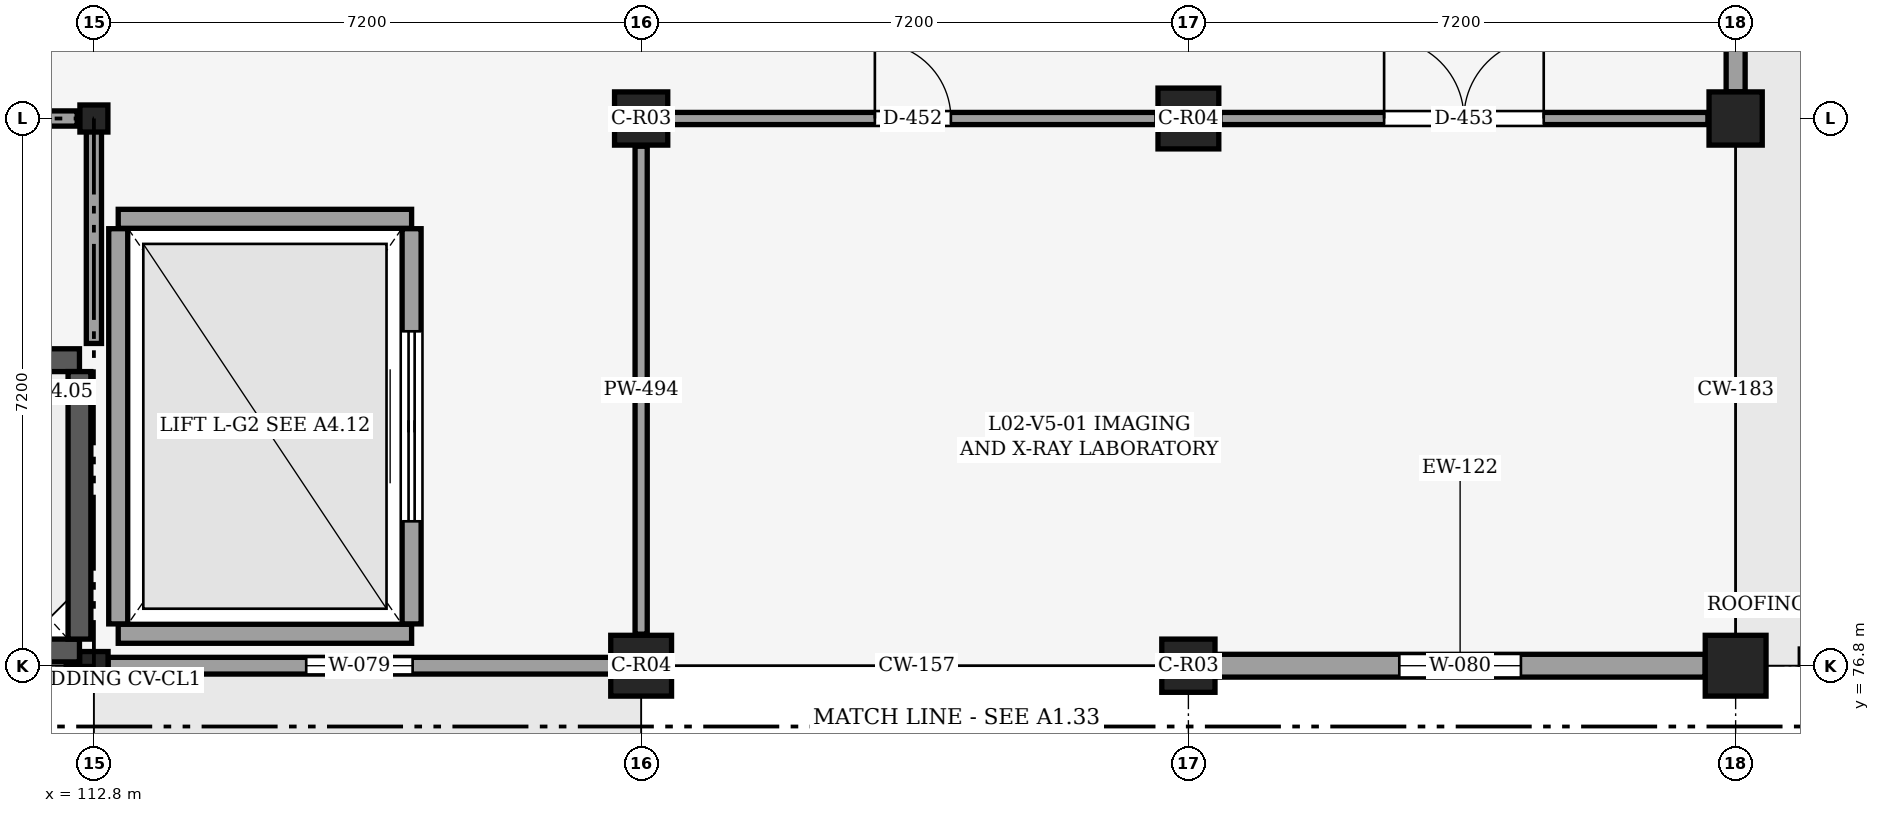
"""IFC4 building model, lengths in metres.
Left out: names, types, materials, properties, quantities, classifications, styles, units other than length and angle.
Written with IfcOpenShell. Run it as: python <this file> out.ifc"""

import sys

from ifc_helpers import new_model, si_unit, direction, frame, frame_2d, origin, origin_2d, place, context, subcontext, project, spatial, rectangle, i_section, extrude, element, fill, save


model = new_model("IFC4")
c1 = context("Model", 3, precision=1e-05, world=origin(), true_north=direction((0.0, 1.0)))
c2 = subcontext(c1, "Body", "Model", "MODEL_VIEW")
j1 = project(units=[si_unit("LENGTHUNIT", "METRE"), si_unit("PLANEANGLEUNIT", "RADIAN")], contexts=[c1])
p1 = place(None, origin())
s1 = spatial("IfcSite", under=j1, at=p1, CompositionType="ELEMENT")
p2 = place(p1, origin())
s2 = spatial("IfcBuilding", under=s1, at=p2, CompositionType="ELEMENT")
p3 = place(p2, frame((0.0, 0.0, 10.2)))
s3 = spatial("IfcBuildingStorey", under=s2, at=p3, CompositionType="ELEMENT", Elevation=10.2)
p4 = place(p3, frame((112.8, 76.8, 0.0), z_axis=(0.0, 0.0, 1.0), x_axis=(1.0, 0.0, 0.0)))
e1 = element("IfcColumn", 1, at=p4, inside=s3, PredefinedType="COLUMN", context=c2, shape_type="SweptSolid", body=[
    extrude(i_section(OverallWidth=0.373, OverallDepth=0.373, WebThickness=0.016, FlangeThickness=0.026, FilletRadius=0.025, at=origin_2d()), origin(), (0.0, 0.0, 1.0), 4.8),
])
p5 = place(p3, frame((112.8, 84.0, 0.0), z_axis=(0.0, 0.0, 1.0), x_axis=(1.0, 0.0, 0.0)))
e2 = element("IfcColumn", 2, at=p5, inside=s3, PredefinedType="COLUMN", context=c2, shape_type="SweptSolid", body=[
    extrude(i_section(OverallWidth=0.368, OverallDepth=0.356, WebThickness=0.011, FlangeThickness=0.018, FilletRadius=0.025, at=origin_2d()), origin(), (0.0, 0.0, 1.0), 4.8),
])
p6 = place(p3, frame((120.0, 76.8, 0.0), z_axis=(0.0, 0.0, 1.0), x_axis=(1.0, 0.0, 0.0)))
e3 = element("IfcColumn", 3, at=p6, inside=s3, PredefinedType="COLUMN", context=c2, shape_type="SweptSolid", body=[
    extrude(rectangle(XDim=0.8, YDim=0.8, at=origin_2d()), origin(), (0.0, 0.0, 1.0), 4.8),
])
for number, where, z_axis, x_axis in (
    (4, (120.0, 84.0, 0.0), (0.0, 0.0, 1.0), (1.0, 0.0, 0.0)),
    (5, (127.2, 76.8, 0.0), (0.0, 0.0, 1.0), (1.0, 0.0, 0.0)),
):
    element("IfcColumn", number, at=place(p3, frame(where, z_axis=z_axis, x_axis=x_axis)), inside=s3, PredefinedType="COLUMN", context=c2, shape_type="SweptSolid", body=[
        extrude(rectangle(XDim=0.7, YDim=0.7, at=origin_2d()), origin(), (0.0, 0.0, 1.0), 4.8),
    ])
for number, where, z_axis, x_axis in (
    (6, (127.2, 84.0, 0.0), (0.0, 0.0, 1.0), (1.0, 0.0, 0.0)),
    (7, (134.4, 76.8, 0.0), (0.0, 0.0, 1.0), (1.0, 0.0, 0.0)),
):
    element("IfcColumn", number, at=place(p3, frame(where, z_axis=z_axis, x_axis=x_axis)), inside=s3, PredefinedType="COLUMN", context=c2, shape_type="SweptSolid", body=[
        extrude(rectangle(XDim=0.8, YDim=0.8, at=origin_2d()), origin(), (0.0, 0.0, 1.0), 4.8),
    ])
p7 = place(p3, frame((134.4, 84.0, 0.0), z_axis=(0.0, 0.0, 1.0), x_axis=(1.0, 0.0, 0.0)))
e8 = element("IfcColumn", 8, at=p7, inside=s3, PredefinedType="COLUMN", context=c2, shape_type="SweptSolid", body=[
    extrude(rectangle(XDim=0.7, YDim=0.7, at=origin_2d()), origin(), (0.0, 0.0, 1.0), 4.8),
])
p8 = place(p3, frame((119.6, 76.8, 0.0), z_axis=(0.0, 0.0, 1.0), x_axis=(-1.0, 0.0, 0.0)))
e9 = element("IfcWall", 9, at=p8, inside=s3, PredefinedType="SOLIDWALL", context=c2, shape_type="SweptSolid", body=[
    extrude(rectangle(XDim=6.614, YDim=0.22, at=frame_2d((3.307, 0.0))), origin(), (0.0, 0.0, 1.0), 3.933),
])
p9 = place(p8, frame((2.607, 0.0, 0.9)))
e10 = element("IfcOpeningElement", 10, at=p9, cuts=e9, PredefinedType="OPENING", context=c2, shape_type="SweptSolid", body=[
    extrude(rectangle(XDim=1.4, YDim=1.75, at=frame_2d((0.7, 0.875))), frame((0.0, 0.12, 0.0), z_axis=(0.0, -1.0, 0.0), x_axis=(1.0, 0.0, 0.0)), (0.0, 0.0, 1.0), 0.24),
])
p10 = place(p3, frame((134.0, 76.8, 0.0), z_axis=(0.0, 0.0, 1.0), x_axis=(-1.0, 0.0, 0.0)))
e11 = element("IfcWall", 11, at=p10, inside=s3, PredefinedType="SOLIDWALL", context=c2, shape_type="SweptSolid", body=[
    extrude(rectangle(XDim=6.45, YDim=0.3, at=frame_2d((3.225, 0.0))), origin(), (0.0, 0.0, 1.0), 4.184),
])
p11 = place(p10, frame((2.425, 0.0, 0.9)))
e12 = element("IfcOpeningElement", 12, at=p11, cuts=e11, PredefinedType="OPENING", context=c2, shape_type="SweptSolid", body=[
    extrude(rectangle(XDim=1.6, YDim=1.75, at=frame_2d((0.8, 0.875))), frame((0.0, 0.16, 0.0), z_axis=(0.0, -1.0, 0.0), x_axis=(1.0, 0.0, 0.0)), (0.0, 0.0, 1.0), 0.321),
])
p12 = place(p3, frame((134.4, 90.8, 0.0), z_axis=(0.0, 0.0, 1.0), x_axis=(0.0, -1.0, 0.0)))
e13 = element("IfcWall", 13, at=p12, inside=s3, PredefinedType="SOLIDWALL", context=c2, shape_type="SweptSolid", body=[
    extrude(rectangle(XDim=6.45, YDim=0.25, at=frame_2d((3.225, 0.0))), origin(), (0.0, 0.0, 1.0), 3.928),
])
p13 = place(p12, frame((0.75, 0.0, 0.9)))
e14 = element("IfcOpeningElement", 14, at=p13, cuts=e13, PredefinedType="OPENING", context=c2, shape_type="SweptSolid", body=[
    extrude(rectangle(XDim=1.2, YDim=1.5, at=frame_2d((0.6, 0.75))), frame((0.0, 0.135, 0.0), z_axis=(0.0, -1.0, 0.0), x_axis=(1.0, 0.0, 0.0)), (0.0, 0.0, 1.0), 0.271),
])
p14 = place(p3, frame((104.59, 77.0, 0.0), z_axis=(0.0, 0.0, 1.0), x_axis=(1.0, 0.0, 0.0)))
e15 = element("IfcWall", 15, at=p14, inside=s3, PredefinedType="SHEAR", context=c2, shape_type="SweptSolid", body=[
    extrude(rectangle(XDim=8.02, YDim=0.3, at=frame_2d((4.01, 0.0))), origin(), (0.0, 0.0, 1.0), 4.56),
])
p15 = place(p3, frame((104.59, 80.82, 0.0), z_axis=(0.0, 0.0, 1.0), x_axis=(1.0, 0.0, 0.0)))
e16 = element("IfcWall", 16, at=p15, inside=s3, PredefinedType="SHEAR", context=c2, shape_type="SweptSolid", body=[
    extrude(rectangle(XDim=8.02, YDim=0.3, at=frame_2d((4.01, 0.0))), origin(), (0.0, 0.0, 1.0), 4.56),
])
p16 = place(p15, frame((0.45, 0.0, 0.0)))
e17 = element("IfcOpeningElement", 17, at=p16, cuts=e16, PredefinedType="OPENING", context=c2, shape_type="SweptSolid", body=[
    extrude(rectangle(XDim=1.1, YDim=2.15, at=frame_2d((0.55, 1.075))), frame((0.0, 0.16, 0.0), z_axis=(0.0, -1.0, 0.0), x_axis=(1.0, 0.0, 0.0)), (0.0, 0.0, 1.0), 0.321),
])
p17 = place(p3, frame((112.61, 77.15, 0.0), z_axis=(0.0, 0.0, 1.0), x_axis=(0.0, 1.0, 0.0)))
e18 = element("IfcWall", 18, at=p17, inside=s3, PredefinedType="SHEAR", context=c2, shape_type="SweptSolid", body=[
    extrude(rectangle(XDim=3.52, YDim=0.3, at=frame_2d((1.76, 0.0))), origin(), (0.0, 0.0, 1.0), 4.56),
])
p18 = place(p3, frame((112.8, 81.04, 0.0), z_axis=(0.0, 0.0, 1.0), x_axis=(0.0, 1.0, 0.0)))
e19 = element("IfcWall", 19, at=p18, inside=s3, PredefinedType="PARTITIONING", context=c2, shape_type="SweptSolid", body=[
    extrude(rectangle(XDim=2.94, YDim=0.2, at=frame_2d((1.47, 0.0))), origin(), (0.0, 0.0, 1.0), 3.928),
])
p19 = place(p3, frame((104.62, 84.0, 0.0), z_axis=(0.0, 0.0, 1.0), x_axis=(1.0, 0.0, 0.0)))
e20 = element("IfcWall", 20, at=p19, inside=s3, PredefinedType="PARTITIONING", context=c2, shape_type="SweptSolid", body=[
    extrude(rectangle(XDim=7.96, YDim=0.2, at=frame_2d((3.98, 0.0))), origin(), (0.0, 0.0, 1.0), 3.847),
])
p20 = place(p19, frame((3.255, 0.0, 0.0)))
e21 = element("IfcOpeningElement", 21, at=p20, cuts=e20, PredefinedType="OPENING", context=c2, shape_type="SweptSolid", body=[
    extrude(rectangle(XDim=1.45, YDim=2.2, at=frame_2d((0.725, 1.1))), frame((0.0, 0.11, 0.0), z_axis=(0.0, -1.0, 0.0), x_axis=(1.0, 0.0, 0.0)), (0.0, 0.0, 1.0), 0.22),
])
for number, where, z_axis, x_axis in (
    (22, (113.12, 82.68, 0.0), (0.0, 0.0, 1.0), (1.0, 0.0, 0.0)),
    (23, (113.12, 77.22, 0.0), (0.0, 0.0, 1.0), (1.0, 0.0, 0.0)),
):
    element("IfcWall", number, at=place(p3, frame(where, z_axis=z_axis, x_axis=x_axis)), inside=s3, PredefinedType="PARTITIONING", context=c2, shape_type="SweptSolid", body=[
        extrude(rectangle(XDim=3.86, YDim=0.25, at=frame_2d((1.93, 0.0))), origin(), (0.0, 0.0, 1.0), 4.56),
    ])
p21 = place(p3, frame((113.12, 77.35, 0.0), z_axis=(0.0, 0.0, 1.0), x_axis=(0.0, 1.0, 0.0)))
e24 = element("IfcWall", 24, at=p21, inside=s3, PredefinedType="PARTITIONING", context=c2, shape_type="SweptSolid", body=[
    extrude(rectangle(XDim=5.2, YDim=0.25, at=frame_2d((2.6, 0.0))), origin(), (0.0, 0.0, 1.0), 3.928),
])
p22 = place(p3, frame((116.98, 77.35, 0.0), z_axis=(0.0, 0.0, 1.0), x_axis=(0.0, 1.0, 0.0)))
e25 = element("IfcWall", 25, at=p22, inside=s3, PredefinedType="PARTITIONING", context=c2, shape_type="SweptSolid", body=[
    extrude(rectangle(XDim=5.2, YDim=0.25, at=frame_2d((2.6, 0.0))), origin(), (0.0, 0.0, 1.0), 4.56),
])
p23 = place(p22, frame((1.35, 0.0, 0.0)))
e26 = element("IfcOpeningElement", 26, at=p23, cuts=e25, PredefinedType="OPENING", context=c2, shape_type="SweptSolid", body=[
    extrude(rectangle(XDim=2.5, YDim=2.6, at=frame_2d((1.25, 1.3))), frame((0.0, 0.135, 0.0), z_axis=(0.0, -1.0, 0.0), x_axis=(1.0, 0.0, 0.0)), (0.0, 0.0, 1.0), 0.271),
])
p24 = place(p3, frame((120.0, 77.215, 0.0), z_axis=(0.0, 0.0, 1.0), x_axis=(0.0, 1.0, 0.0)))
e27 = element("IfcWall", 27, at=p24, inside=s3, PredefinedType="PARTITIONING", context=c2, shape_type="SweptSolid", body=[
    extrude(rectangle(XDim=6.42, YDim=0.16, at=frame_2d((3.21, 0.0))), origin(), (0.0, 0.0, 1.0), 3.933),
])
p25 = place(p3, frame((120.365, 84.0, 0.0), z_axis=(0.0, 0.0, 1.0), x_axis=(1.0, 0.0, 0.0)))
e28 = element("IfcWall", 28, at=p25, inside=s3, PredefinedType="PARTITIONING", context=c2, shape_type="SweptSolid", body=[
    extrude(rectangle(XDim=6.42, YDim=0.16, at=frame_2d((3.21, 0.0))), origin(), (0.0, 0.0, 1.0), 4.007),
])
p26 = place(p25, frame((2.71, 0.0, 0.0)))
e29 = element("IfcOpeningElement", 29, at=p26, cuts=e28, PredefinedType="OPENING", context=c2, shape_type="SweptSolid", body=[
    extrude(rectangle(XDim=1.0, YDim=2.15, at=frame_2d((0.5, 1.075))), frame((0.0, 0.09, 0.0), z_axis=(0.0, -1.0, 0.0), x_axis=(1.0, 0.0, 0.0)), (0.0, 0.0, 1.0), 0.18),
])
p27 = place(p3, frame((127.615, 84.0, 0.0), z_axis=(0.0, 0.0, 1.0), x_axis=(1.0, 0.0, 0.0)))
e30 = element("IfcWall", 30, at=p27, inside=s3, PredefinedType="PARTITIONING", context=c2, shape_type="SweptSolid", body=[
    extrude(rectangle(XDim=6.42, YDim=0.16, at=frame_2d((3.21, 0.0))), origin(), (0.0, 0.0, 1.0), 4.078),
])
p28 = place(p27, frame((2.16, 0.0, 0.0)))
e31 = element("IfcOpeningElement", 31, at=p28, cuts=e30, PredefinedType="OPENING", context=c2, shape_type="SweptSolid", body=[
    extrude(rectangle(XDim=2.1, YDim=2.5, at=frame_2d((1.05, 1.25))), frame((0.0, 0.09, 0.0), z_axis=(0.0, -1.0, 0.0), x_axis=(1.0, 0.0, 0.0)), (0.0, 0.0, 1.0), 0.18),
])
p29 = place(p9, origin())
e32 = element("IfcWindow", 32, at=p29, inside=s3, PartitioningType="SINGLE_PANEL", PredefinedType="WINDOW", context=c2, shape_type="SweptSolid", body=[
    extrude(rectangle(XDim=1.4, YDim=1.75, at=frame_2d((0.7, 0.875))), frame((0.0, 0.03, 0.0), z_axis=(0.0, -1.0, 0.0), x_axis=(1.0, 0.0, 0.0)), (0.0, 0.0, 1.0), 0.06),
])
fill(e10, e32)
p30 = place(p11, origin())
e33 = element("IfcWindow", 33, at=p30, inside=s3, PartitioningType="SINGLE_PANEL", PredefinedType="WINDOW", context=c2, shape_type="SweptSolid", body=[
    extrude(rectangle(XDim=1.6, YDim=1.75, at=frame_2d((0.8, 0.875))), frame((0.0, 0.03, 0.0), z_axis=(0.0, -1.0, 0.0), x_axis=(1.0, 0.0, 0.0)), (0.0, 0.0, 1.0), 0.06),
])
fill(e12, e33)
p31 = place(p23, origin())
e34 = element("IfcDoor", 34, at=p31, inside=s3, OperationType="DOUBLE_DOOR_SLIDING", PredefinedType="DOOR", context=c2, shape_type="SweptSolid", body=[
    extrude(rectangle(XDim=2.5, YDim=2.6, at=frame_2d((1.25, 1.3))), frame((0.0, 0.025, 0.0), z_axis=(0.0, -1.0, 0.0), x_axis=(1.0, 0.0, 0.0)), (0.0, 0.0, 1.0), 0.05),
])
fill(e26, e34)
p32 = place(p26, origin())
e35 = element("IfcDoor", 35, at=p32, inside=s3, OperationType="SINGLE_SWING_LEFT", PredefinedType="DOOR", context=c2, shape_type="SweptSolid", body=[
    extrude(rectangle(XDim=1.0, YDim=2.15, at=frame_2d((0.5, 1.075))), frame((0.0, 0.025, 0.0), z_axis=(0.0, -1.0, 0.0), x_axis=(1.0, 0.0, 0.0)), (0.0, 0.0, 1.0), 0.05),
])
fill(e29, e35)
p33 = place(p28, origin())
e36 = element("IfcDoor", 36, at=p33, inside=s3, OperationType="DOUBLE_DOOR_SINGLE_SWING", PredefinedType="DOOR", context=c2, shape_type="SweptSolid", body=[
    extrude(rectangle(XDim=2.1, YDim=2.5, at=frame_2d((1.05, 1.25))), frame((0.0, 0.025, 0.0), z_axis=(0.0, -1.0, 0.0), x_axis=(1.0, 0.0, 0.0)), (0.0, 0.0, 1.0), 0.05),
])
fill(e31, e36)
save(model, sys.argv[1])
